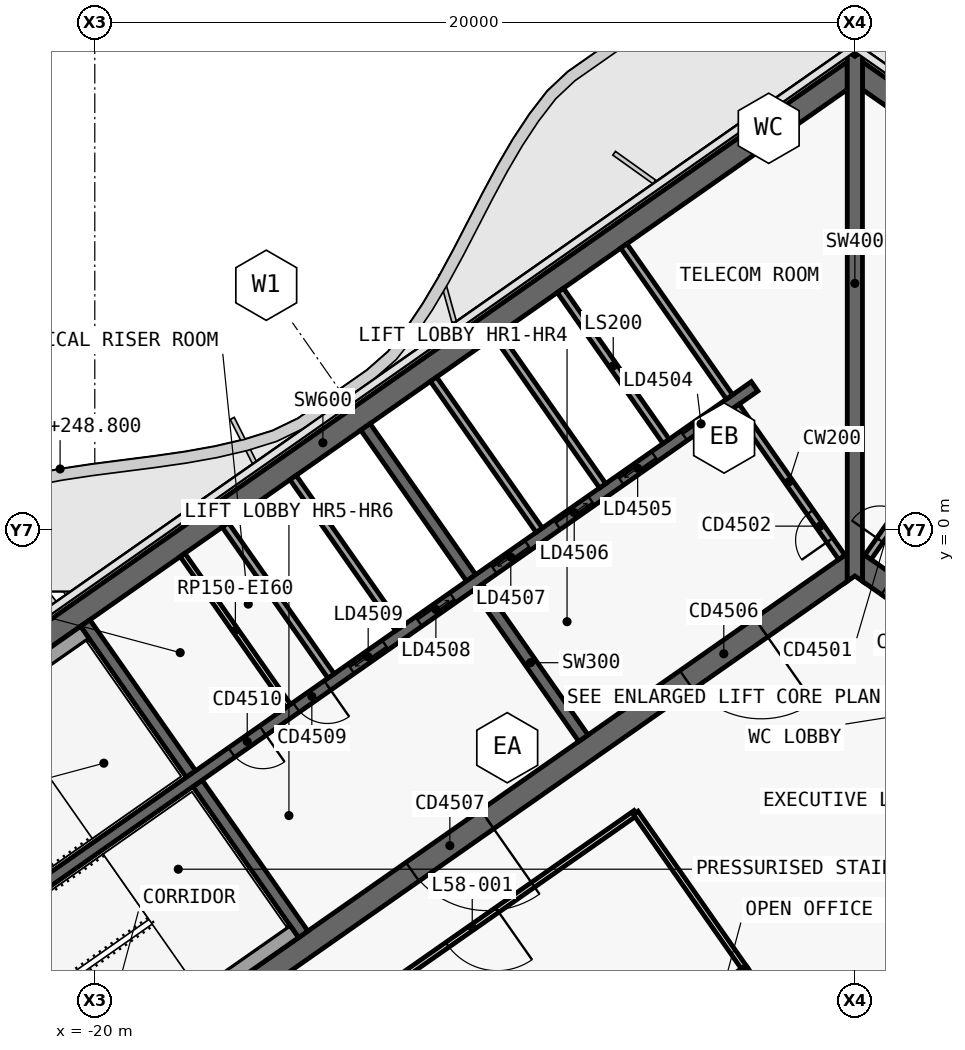
"""IFC4 building model, lengths in metres.
Left out: names, types, materials, properties, quantities, classifications, styles, units other than length and angle.
Written with IfcOpenShell. Run it as: python <this file> out.ifc"""

import sys

from ifc_helpers import new_model, si_unit, direction, frame, frame_2d, origin, place, context, subcontext, project, spatial, polyline, rectangle, outline, extrude, element, fill, save


model = new_model("IFC4")
c1 = context("Model", 3, precision=1e-05, world=origin(), true_north=direction((0.0, 1.0)))
c2 = subcontext(c1, "Body", "Model", "MODEL_VIEW")
j1 = project(units=[si_unit("LENGTHUNIT", "METRE"), si_unit("PLANEANGLEUNIT", "RADIAN")], contexts=[c1])
p1 = place(None, origin())
s1 = spatial("IfcSite", under=j1, at=p1, CompositionType="ELEMENT")
p2 = place(p1, origin())
s2 = spatial("IfcBuilding", under=s1, at=p2, CompositionType="ELEMENT")
p3 = place(p2, frame((0.0, 0.0, 248.8)))
s3 = spatial("IfcBuildingStorey", under=s2, at=p3, CompositionType="ELEMENT", Elevation=248.8)
p4 = place(p3, frame((-0.028, 12.066, 0.0), z_axis=(0.0, 0.0, 1.0), x_axis=(-0.819151382952, -0.573577380837, 0.0)))
e1 = element("IfcWall", 1, at=p4, inside=s3, PredefinedType="SHEAR", context=c2, shape_type="SweptSolid", body=[
    extrude(outline(polyline([(33.898, 0.3), (0.42, 0.3), (0.0, -0.3), (33.898, -0.3), (33.898, 0.3)])), origin(), (0.0, 0.0, 1.0), 3.9),
])
p5 = place(p3, frame((-0.028, -0.874, 0.0), z_axis=(0.0, 0.0, 1.0), x_axis=(-0.819150035022, -0.573579305871, 0.0)))
e2 = element("IfcWall", 2, at=p5, inside=s3, PredefinedType="SHEAR", context=c2, shape_type="SweptSolid", body=[
    extrude(outline(polyline([(26.476, 0.3), (0.42, 0.3), (0.0, -0.3), (26.476, -0.3), (26.476, 0.3)])), origin(), (0.0, 0.0, 1.0), 3.9),
])
p6 = place(p5, frame((2.976, 0.0, 0.0)))
e3 = element("IfcOpeningElement", 3, at=p6, cuts=e2, PredefinedType="OPENING", context=c2, shape_type="SweptSolid", body=[
    extrude(rectangle(XDim=2.4, YDim=2.1, at=frame_2d((1.2, 1.05))), frame((0.0, 0.31, 0.0), z_axis=(0.0, -1.0, 0.0), x_axis=(1.0, 0.0, 0.0)), (0.0, 0.0, 1.0), 0.62),
])
p7 = place(p5, frame((11.776, 0.0, 0.0)))
e4 = element("IfcOpeningElement", 4, at=p7, cuts=e2, PredefinedType="OPENING", context=c2, shape_type="SweptSolid", body=[
    extrude(rectangle(XDim=2.4, YDim=2.1, at=frame_2d((1.2, 1.05))), frame((0.0, 0.31, 0.0), z_axis=(0.0, -1.0, 0.0), x_axis=(1.0, 0.0, 0.0)), (0.0, 0.0, 1.0), 0.62),
])
p8 = place(p3, frame((-7.143, -5.49, 0.0), z_axis=(0.0, 0.0, 1.0), x_axis=(-0.573617744349, 0.819123118565, 0.0)))
e5 = element("IfcWall", 5, at=p8, inside=s3, PredefinedType="SHEAR", context=c2, shape_type="SweptSolid", body=[
    extrude(outline(polyline([(4.85, 0.15), (0.0, 0.15), (0.0, -0.15), (4.85, -0.15), (4.85, 0.15)])), origin(), (0.0, 0.0, 1.0), 3.9),
])
p9 = place(p3, frame((-10.097, -1.271, 0.0), z_axis=(0.0, 0.0, 1.0), x_axis=(-0.573560315113, 0.819163332265, 0.0)))
e6 = element("IfcWall", 6, at=p9, inside=s3, PredefinedType="SHEAR", context=c2, shape_type="SweptSolid", body=[
    extrude(outline(polyline([(4.85, -0.15), (4.85, 0.15), (0.0, 0.15), (0.0, -0.15), (4.85, -0.15)])), origin(), (0.0, 0.0, 1.0), 3.9),
])
p10 = place(p3, frame((-14.515, -10.652, 0.0), z_axis=(0.0, 0.0, 1.0), x_axis=(-0.573560315113, 0.819163332265, 0.0)))
e7 = element("IfcWall", 7, at=p10, inside=s3, PredefinedType="SHEAR", context=c2, shape_type="SweptSolid", body=[
    extrude(outline(polyline([(4.85, 0.15), (0.0, 0.15), (0.0, -0.15), (4.85, -0.15), (4.85, 0.15)])), origin(), (0.0, 0.0, 1.0), 3.9),
])
p11 = place(p3, frame((-17.469, -6.433, 0.0), z_axis=(0.0, 0.0, 1.0), x_axis=(-0.573594092424, 0.81913968109, 0.0)))
e8 = element("IfcWall", 8, at=p11, inside=s3, PredefinedType="SHEAR", context=c2, shape_type="SweptSolid", body=[
    extrude(outline(polyline([(4.85, -0.15), (4.85, 0.15), (0.0, 0.15), (0.0, -0.15), (4.85, -0.15)])), origin(), (0.0, 0.0, 1.0), 3.9),
])
p12 = place(p3, frame((-2.638, 3.768, 0.0), z_axis=(0.0, 0.0, 1.0), x_axis=(-0.819155014212, -0.573572194837, 0.0)))
e9 = element("IfcWall", 9, at=p12, inside=s3, PredefinedType="SHEAR", context=c2, shape_type="SweptSolid", body=[
    extrude(outline(polyline([(26.4, 0.15), (0.0, 0.15), (0.0, -0.15), (26.4, -0.15), (26.4, 0.15)])), origin(), (0.0, 0.0, 1.0), 3.9),
])
p13 = place(p12, frame((1.169, 0.0, 0.0)))
e10 = element("IfcOpeningElement", 10, at=p13, cuts=e9, PredefinedType="OPENING", context=c2, shape_type="SweptSolid", body=[
    extrude(rectangle(XDim=1.1, YDim=2.1, at=frame_2d((0.55, 1.05))), frame((0.0, 0.16, 0.0), z_axis=(0.0, -1.0, 0.0), x_axis=(1.0, 0.0, 0.0)), (0.0, 0.0, 1.0), 0.32),
])
p14 = place(p12, frame((3.206, 0.0, 0.0)))
e11 = element("IfcOpeningElement", 11, at=p14, cuts=e9, PredefinedType="OPENING", context=c2, shape_type="SweptSolid", body=[
    extrude(rectangle(XDim=1.1, YDim=2.1, at=frame_2d((0.55, 1.05))), frame((0.0, 0.16, 0.0), z_axis=(0.0, -1.0, 0.0), x_axis=(1.0, 0.0, 0.0)), (0.0, 0.0, 1.0), 0.32),
])
p15 = place(p12, frame((5.244, 0.0, 0.0)))
e12 = element("IfcOpeningElement", 12, at=p15, cuts=e9, PredefinedType="OPENING", context=c2, shape_type="SweptSolid", body=[
    extrude(rectangle(XDim=1.1, YDim=2.1, at=frame_2d((0.55, 1.05))), frame((0.0, 0.16, 0.0), z_axis=(0.0, -1.0, 0.0), x_axis=(1.0, 0.0, 0.0)), (0.0, 0.0, 1.0), 0.32),
])
p16 = place(p12, frame((7.281, 0.0, 0.0)))
e13 = element("IfcOpeningElement", 13, at=p16, cuts=e9, PredefinedType="OPENING", context=c2, shape_type="SweptSolid", body=[
    extrude(rectangle(XDim=1.1, YDim=2.1, at=frame_2d((0.55, 1.05))), frame((0.0, 0.16, 0.0), z_axis=(0.0, -1.0, 0.0), x_axis=(1.0, 0.0, 0.0)), (0.0, 0.0, 1.0), 0.32),
])
p17 = place(p12, frame((9.688, 0.0, 0.0)))
e14 = element("IfcOpeningElement", 14, at=p17, cuts=e9, PredefinedType="OPENING", context=c2, shape_type="SweptSolid", body=[
    extrude(rectangle(XDim=1.1, YDim=2.1, at=frame_2d((0.55, 1.05))), frame((0.0, 0.16, 0.0), z_axis=(0.0, -1.0, 0.0), x_axis=(1.0, 0.0, 0.0)), (0.0, 0.0, 1.0), 0.32),
])
p18 = place(p12, frame((11.863, 0.0, 0.0)))
e15 = element("IfcOpeningElement", 15, at=p18, cuts=e9, PredefinedType="OPENING", context=c2, shape_type="SweptSolid", body=[
    extrude(rectangle(XDim=1.1, YDim=2.1, at=frame_2d((0.55, 1.05))), frame((0.0, 0.16, 0.0), z_axis=(0.0, -1.0, 0.0), x_axis=(1.0, 0.0, 0.0)), (0.0, 0.0, 1.0), 0.32),
])
p19 = place(p12, frame((13.722, 0.0, 0.0)))
e16 = element("IfcOpeningElement", 16, at=p19, cuts=e9, PredefinedType="OPENING", context=c2, shape_type="SweptSolid", body=[
    extrude(rectangle(XDim=1.0, YDim=2.1, at=frame_2d((0.5, 1.05))), frame((0.0, 0.16, 0.0), z_axis=(0.0, -1.0, 0.0), x_axis=(1.0, 0.0, 0.0)), (0.0, 0.0, 1.0), 0.32),
])
p20 = place(p12, frame((15.798, 0.0, 0.0)))
e17 = element("IfcOpeningElement", 17, at=p20, cuts=e9, PredefinedType="OPENING", context=c2, shape_type="SweptSolid", body=[
    extrude(rectangle(XDim=1.0, YDim=2.1, at=frame_2d((0.5, 1.05))), frame((0.0, 0.16, 0.0), z_axis=(0.0, -1.0, 0.0), x_axis=(1.0, 0.0, 0.0)), (0.0, 0.0, 1.0), 0.32),
])
p21 = place(p3, frame((0.028, 12.066, 0.0), z_axis=(0.0, 0.0, 1.0), x_axis=(0.819151382952, -0.573577380837, 0.0)))
e18 = element("IfcWall", 18, at=p21, inside=s3, PredefinedType="SHEAR", context=c2, shape_type="SweptSolid", body=[
    extrude(outline(polyline([(33.898, 0.3), (0.0, 0.3), (0.42, -0.3), (33.898, -0.3), (33.898, 0.3)])), origin(), (0.0, 0.0, 1.0), 3.9),
])
p22 = place(p3, frame((0.028, -0.874, 0.0), z_axis=(0.0, 0.0, 1.0), x_axis=(0.819150035022, -0.573579305871, 0.0)))
e19 = element("IfcWall", 19, at=p22, inside=s3, PredefinedType="SHEAR", context=c2, shape_type="SweptSolid", body=[
    extrude(outline(polyline([(26.476, 0.3), (0.0, 0.3), (0.42, -0.3), (26.476, -0.3), (26.476, 0.3)])), origin(), (0.0, 0.0, 1.0), 3.9),
])
p23 = place(p22, frame((1.026, 0.0, 0.0)))
e20 = element("IfcOpeningElement", 20, at=p23, cuts=e19, PredefinedType="OPENING", context=c2, shape_type="SweptSolid", body=[
    extrude(rectangle(XDim=1.5, YDim=2.1, at=frame_2d((0.75, 1.05))), frame((0.0, 0.31, 0.0), z_axis=(0.0, -1.0, 0.0), x_axis=(1.0, 0.0, 0.0)), (0.0, 0.0, 1.0), 0.62),
])
p24 = place(p22, frame((12.226, 0.0, 0.0)))
e21 = element("IfcOpeningElement", 21, at=p24, cuts=e19, PredefinedType="OPENING", context=c2, shape_type="SweptSolid", body=[
    extrude(rectangle(XDim=1.5, YDim=2.1, at=frame_2d((0.75, 1.05))), frame((0.0, 0.31, 0.0), z_axis=(0.0, -1.0, 0.0), x_axis=(1.0, 0.0, 0.0)), (0.0, 0.0, 1.0), 0.62),
])
p25 = place(p3, frame((0.0, -1.361, 0.0), z_axis=(0.0, 0.0, 1.0), x_axis=(0.0, 1.0, 0.0)))
e22 = element("IfcWall", 22, at=p25, inside=s3, PredefinedType="SHEAR", context=c2, shape_type="SweptSolid", body=[
    extrude(outline(polyline([(0.14, 0.2), (0.0, 0.2), (0.14, 0.0), (0.0, -0.2), (0.14, -0.2), (1.012, -0.2), (12.94, -0.2), (13.813, -0.2), (13.893, -0.2), (13.933, -0.172), (13.813, 0.0), (13.933, 0.172), (13.893, 0.2), (13.813, 0.2), (12.94, 0.2), (1.012, 0.2), (0.14, 0.2)])), origin(), (0.0, 0.0, 1.0), 3.9),
])
p26 = place(p3, frame((-4.967, 2.321, 0.0), z_axis=(0.0, 0.0, 1.0), x_axis=(-0.573594092424, 0.81913968109, 0.0)))
e23 = element("IfcWall", 23, at=p26, inside=s3, PredefinedType="SOLIDWALL", context=c2, shape_type="SweptSolid", body=[
    extrude(rectangle(XDim=4.85, YDim=0.2, at=frame_2d((2.425, 0.0))), origin(), (0.0, 0.0, 1.0), 3.9),
])
p27 = place(p3, frame((-6.636, 1.152, 0.0), z_axis=(0.0, 0.0, 1.0), x_axis=(-0.573560315113, 0.819163332265, 0.0)))
e24 = element("IfcWall", 24, at=p27, inside=s3, PredefinedType="SOLIDWALL", context=c2, shape_type="SweptSolid", body=[
    extrude(rectangle(XDim=4.85, YDim=0.2, at=frame_2d((2.425, 0.0))), origin(), (0.0, 0.0, 1.0), 3.9),
])
p28 = place(p3, frame((-8.305, -0.017, 0.0), z_axis=(0.0, 0.0, 1.0), x_axis=(-0.573594092424, 0.81913968109, 0.0)))
e25 = element("IfcWall", 25, at=p28, inside=s3, PredefinedType="SOLIDWALL", context=c2, shape_type="SweptSolid", body=[
    extrude(rectangle(XDim=4.85, YDim=0.2, at=frame_2d((2.425, 0.0))), origin(), (0.0, 0.0, 1.0), 3.9),
])
p29 = place(p3, frame((-14.909, -4.641, 0.0), z_axis=(0.0, 0.0, 1.0), x_axis=(-0.573560315113, 0.819163332265, 0.0)))
e26 = element("IfcWall", 26, at=p29, inside=s3, PredefinedType="PARTITIONING", context=c2, shape_type="SweptSolid", body=[
    extrude(rectangle(XDim=4.85, YDim=0.15, at=frame_2d((2.425, 0.0))), origin(), (0.0, 0.0, 1.0), 3.62),
])
p30 = place(p3, frame((-12.001, -2.605, 0.0), z_axis=(0.0, 0.0, 1.0), x_axis=(-0.573560315113, 0.819163332265, 0.0)))
e27 = element("IfcWall", 27, at=p30, inside=s3, PredefinedType="SOLIDWALL", context=c2, shape_type="SweptSolid", body=[
    extrude(rectangle(XDim=4.85, YDim=0.2, at=frame_2d((2.425, 0.0))), origin(), (0.0, 0.0, 1.0), 3.9),
])
p31 = place(p3, frame((-13.783, -3.852, 0.0), z_axis=(0.0, 0.0, 1.0), x_axis=(-0.573594092424, 0.81913968109, 0.0)))
e28 = element("IfcWall", 28, at=p31, inside=s3, PredefinedType="SOLIDWALL", context=c2, shape_type="SweptSolid", body=[
    extrude(rectangle(XDim=4.85, YDim=0.2, at=frame_2d((2.425, 0.0))), origin(), (0.0, 0.0, 1.0), 3.9),
])
p32 = place(p3, frame((-20.259, -2.71, 0.0), z_axis=(0.0, 0.0, 1.0), x_axis=(-0.81914849389, -0.573581506813, 0.0)))
e29 = element("IfcWall", 29, at=p32, inside=s3, PredefinedType="SOLIDWALL", context=c2, shape_type="SweptSolid", body=[
    extrude(rectangle(XDim=8.25, YDim=0.4, at=frame_2d((4.125, 0.0))), origin(), (0.0, 0.0, 1.0), 3.62),
])
p33 = place(p3, frame((-14.753, -10.574, 0.0), z_axis=(0.0, 0.0, 1.0), x_axis=(-0.819158229677, -0.573567602601, 0.0)))
e30 = element("IfcWall", 30, at=p33, inside=s3, PredefinedType="SOLIDWALL", context=c2, shape_type="SweptSolid", body=[
    extrude(rectangle(XDim=8.25, YDim=0.4, at=frame_2d((4.125, 0.0))), origin(), (0.0, 0.0, 1.0), 3.62),
])
p34 = place(p3, frame((-0.344, -0.729, 0.0), z_axis=(0.0, 0.0, 1.0), x_axis=(-0.573560315113, 0.819163332265, 0.0)))
e31 = element("IfcWall", 31, at=p34, inside=s3, PredefinedType="SOLIDWALL", context=c2, shape_type="SweptSolid", body=[
    extrude(rectangle(XDim=4.85, YDim=0.2, at=frame_2d((2.425, 0.0))), origin(), (0.0, 0.0, 1.0), 3.62),
])
p35 = place(p34, frame((0.55, 0.0, 0.0)))
e32 = element("IfcOpeningElement", 32, at=p35, cuts=e31, PredefinedType="OPENING", context=c2, shape_type="SweptSolid", body=[
    extrude(rectangle(XDim=0.9, YDim=2.1, at=frame_2d((0.45, 1.05))), frame((0.0, 0.11, 0.0), z_axis=(0.0, -1.0, 0.0), x_axis=(1.0, 0.0, 0.0)), (0.0, 0.0, 1.0), 0.22),
])
p36 = place(p3, frame((-3.298, 3.49, 0.0), z_axis=(0.0, 0.0, 1.0), x_axis=(-0.573560315113, 0.819163332265, 0.0)))
e33 = element("IfcWall", 33, at=p36, inside=s3, PredefinedType="SOLIDWALL", context=c2, shape_type="SweptSolid", body=[
    extrude(rectangle(XDim=4.85, YDim=0.2, at=frame_2d((2.425, 0.0))), origin(), (0.0, 0.0, 1.0), 3.62),
])
p37 = place(p3, frame((0.344, -0.729, 0.0), z_axis=(0.0, 0.0, 1.0), x_axis=(0.573560315113, 0.819163332265, 0.0)))
e34 = element("IfcWall", 34, at=p37, inside=s3, PredefinedType="SOLIDWALL", context=c2, shape_type="SweptSolid", body=[
    extrude(rectangle(XDim=4.85, YDim=0.2, at=frame_2d((2.425, 0.0))), origin(), (0.0, 0.0, 1.0), 3.62),
])
p38 = place(p37, frame((0.55, 0.0, 0.0)))
e35 = element("IfcOpeningElement", 35, at=p38, cuts=e34, PredefinedType="OPENING", context=c2, shape_type="SweptSolid", body=[
    extrude(rectangle(XDim=0.9, YDim=2.1, at=frame_2d((0.45, 1.05))), frame((0.0, 0.11, 0.0), z_axis=(0.0, -1.0, 0.0), x_axis=(1.0, 0.0, 0.0)), (0.0, 0.0, 1.0), 0.22),
])
p39 = place(p3, frame((-5.766, -7.456, 0.0), z_axis=(0.0, 0.0, 1.0), x_axis=(-0.819154371039, -0.573573113393, 0.0)))
e36 = element("IfcWall", 36, at=p39, inside=s3, PredefinedType="PARTITIONING", context=c2, shape_type="SweptSolid", body=[
    extrude(rectangle(XDim=10.502, YDim=0.15, at=frame_2d((5.251, 0.0))), origin(), (0.0, 0.0, 1.0), 3.05),
])
p40 = place(p39, frame((4.451, 0.0, 0.0)))
e37 = element("IfcOpeningElement", 37, at=p40, cuts=e36, PredefinedType="OPENING", context=c2, shape_type="SweptSolid", body=[
    extrude(rectangle(XDim=1.6, YDim=2.1, at=frame_2d((0.8, 1.05))), frame((0.0, 0.085, 0.0), z_axis=(0.0, -1.0, 0.0), x_axis=(1.0, 0.0, 0.0)), (0.0, 0.0, 1.0), 0.17),
])
p41 = place(p3, frame((-1.849, -13.051, 0.0), z_axis=(0.0, 0.0, 1.0), x_axis=(-0.573542889209, 0.819175533227, 0.0)))
e38 = element("IfcWall", 38, at=p41, inside=s3, PredefinedType="PARTITIONING", context=c2, shape_type="SweptSolid", body=[
    extrude(rectangle(XDim=1.831, YDim=0.15, at=frame_2d((0.916, 0.0))), origin(), (0.0, 0.0, 1.0), 3.05),
])
p42 = place(p3, frame((-2.897, -11.553, 0.0), z_axis=(0.0, 0.0, 1.0), x_axis=(-0.573593309886, 0.819140229054, 0.0)))
e39 = element("IfcWall", 39, at=p42, inside=s3, PredefinedType="PARTITIONING", context=c2, shape_type="SweptSolid", body=[
    extrude(rectangle(XDim=5.004, YDim=0.15, at=frame_2d((2.502, 0.0))), origin(), (0.0, 0.0, 1.0), 3.05),
])
p43 = place(p3, frame((-2.898, -11.552, 0.0), z_axis=(0.0, 0.0, 1.0), x_axis=(-0.819155448096, -0.573571575181, 0.0)))
e40 = element("IfcWall", 40, at=p43, inside=s3, PredefinedType="PARTITIONING", context=c2, shape_type="SweptSolid", body=[
    extrude(rectangle(XDim=10.5, YDim=0.1, at=frame_2d((5.25, 0.0))), origin(), (0.0, 0.0, 1.0), 3.05),
])
p44 = place(p43, frame((4.8, 0.0, 0.0)))
e41 = element("IfcOpeningElement", 41, at=p44, cuts=e40, PredefinedType="OPENING", context=c2, shape_type="SweptSolid", body=[
    extrude(rectangle(XDim=0.9, YDim=2.1, at=frame_2d((0.45, 1.05))), frame((0.0, 0.06, 0.0), z_axis=(0.0, -1.0, 0.0), x_axis=(1.0, 0.0, 0.0)), (0.0, 0.0, 1.0), 0.12),
])
p45 = place(p13, origin())
e42 = element("IfcDoor", 42, at=p45, inside=s3, OperationType="SLIDING_TO_LEFT", PredefinedType="DOOR", context=c2, shape_type="SweptSolid", body=[
    extrude(rectangle(XDim=1.1, YDim=2.1, at=frame_2d((0.55, 1.05))), frame((0.0, 0.025, 0.0), z_axis=(0.0, -1.0, 0.0), x_axis=(1.0, 0.0, 0.0)), (0.0, 0.0, 1.0), 0.05),
])
fill(e10, e42)
p46 = place(p14, origin())
e43 = element("IfcDoor", 43, at=p46, inside=s3, OperationType="SLIDING_TO_RIGHT", PredefinedType="DOOR", context=c2, shape_type="SweptSolid", body=[
    extrude(rectangle(XDim=1.1, YDim=2.1, at=frame_2d((0.55, 1.05))), frame((0.0, 0.025, 0.0), z_axis=(0.0, -1.0, 0.0), x_axis=(1.0, 0.0, 0.0)), (0.0, 0.0, 1.0), 0.05),
])
fill(e11, e43)
p47 = place(p15, origin())
e44 = element("IfcDoor", 44, at=p47, inside=s3, OperationType="SLIDING_TO_LEFT", PredefinedType="DOOR", context=c2, shape_type="SweptSolid", body=[
    extrude(rectangle(XDim=1.1, YDim=2.1, at=frame_2d((0.55, 1.05))), frame((0.0, 0.025, 0.0), z_axis=(0.0, -1.0, 0.0), x_axis=(1.0, 0.0, 0.0)), (0.0, 0.0, 1.0), 0.05),
])
fill(e12, e44)
p48 = place(p16, origin())
e45 = element("IfcDoor", 45, at=p48, inside=s3, OperationType="SLIDING_TO_RIGHT", PredefinedType="DOOR", context=c2, shape_type="SweptSolid", body=[
    extrude(rectangle(XDim=1.1, YDim=2.1, at=frame_2d((0.55, 1.05))), frame((0.0, 0.025, 0.0), z_axis=(0.0, -1.0, 0.0), x_axis=(1.0, 0.0, 0.0)), (0.0, 0.0, 1.0), 0.05),
])
fill(e13, e45)
p49 = place(p17, origin())
e46 = element("IfcDoor", 46, at=p49, inside=s3, OperationType="SLIDING_TO_LEFT", PredefinedType="DOOR", context=c2, shape_type="SweptSolid", body=[
    extrude(rectangle(XDim=1.1, YDim=2.1, at=frame_2d((0.55, 1.05))), frame((0.0, 0.025, 0.0), z_axis=(0.0, -1.0, 0.0), x_axis=(1.0, 0.0, 0.0)), (0.0, 0.0, 1.0), 0.05),
])
fill(e14, e46)
p50 = place(p18, origin())
e47 = element("IfcDoor", 47, at=p50, inside=s3, OperationType="SLIDING_TO_RIGHT", PredefinedType="DOOR", context=c2, shape_type="SweptSolid", body=[
    extrude(rectangle(XDim=1.1, YDim=2.1, at=frame_2d((0.55, 1.05))), frame((0.0, 0.025, 0.0), z_axis=(0.0, -1.0, 0.0), x_axis=(1.0, 0.0, 0.0)), (0.0, 0.0, 1.0), 0.05),
])
fill(e15, e47)
p51 = place(p19, origin())
e48 = element("IfcDoor", 48, at=p51, inside=s3, OperationType="SINGLE_SWING_RIGHT", PredefinedType="DOOR", context=c2, shape_type="SweptSolid", body=[
    extrude(rectangle(XDim=1.0, YDim=2.1, at=frame_2d((0.5, 1.05))), frame((0.0, 0.025, 0.0), z_axis=(0.0, -1.0, 0.0), x_axis=(1.0, 0.0, 0.0)), (0.0, 0.0, 1.0), 0.05),
])
fill(e16, e48)
p52 = place(p20, origin())
e49 = element("IfcDoor", 49, at=p52, inside=s3, OperationType="SINGLE_SWING_RIGHT", PredefinedType="DOOR", context=c2, shape_type="SweptSolid", body=[
    extrude(rectangle(XDim=1.0, YDim=2.1, at=frame_2d((0.5, 1.05))), frame((0.0, 0.025, 0.0), z_axis=(0.0, -1.0, 0.0), x_axis=(1.0, 0.0, 0.0)), (0.0, 0.0, 1.0), 0.05),
])
fill(e17, e49)
p53 = place(p6, origin())
e50 = element("IfcDoor", 50, at=p53, inside=s3, OperationType="DOUBLE_DOOR_SINGLE_SWING", PredefinedType="DOOR", context=c2, shape_type="SweptSolid", body=[
    extrude(rectangle(XDim=2.4, YDim=2.1, at=frame_2d((1.2, 1.05))), frame((0.0, 0.025, 0.0), z_axis=(0.0, -1.0, 0.0), x_axis=(1.0, 0.0, 0.0)), (0.0, 0.0, 1.0), 0.05),
])
fill(e3, e50)
p54 = place(p7, origin())
e51 = element("IfcDoor", 51, at=p54, inside=s3, OperationType="DOUBLE_DOOR_SINGLE_SWING", PredefinedType="DOOR", context=c2, shape_type="SweptSolid", body=[
    extrude(rectangle(XDim=2.4, YDim=2.1, at=frame_2d((1.2, 1.05))), frame((0.0, 0.025, 0.0), z_axis=(0.0, -1.0, 0.0), x_axis=(1.0, 0.0, 0.0)), (0.0, 0.0, 1.0), 0.05),
])
fill(e4, e51)
p55 = place(p35, origin())
e52 = element("IfcDoor", 52, at=p55, inside=s3, OperationType="SINGLE_SWING_RIGHT", PredefinedType="DOOR", context=c2, shape_type="SweptSolid", body=[
    extrude(rectangle(XDim=0.9, YDim=2.1, at=frame_2d((0.45, 1.05))), frame((0.0, 0.025, 0.0), z_axis=(0.0, -1.0, 0.0), x_axis=(1.0, 0.0, 0.0)), (0.0, 0.0, 1.0), 0.05),
])
fill(e32, e52)
p56 = place(p38, origin())
e53 = element("IfcDoor", 53, at=p56, inside=s3, OperationType="SINGLE_SWING_RIGHT", PredefinedType="DOOR", context=c2, shape_type="SweptSolid", body=[
    extrude(rectangle(XDim=0.9, YDim=2.1, at=frame_2d((0.45, 1.05))), frame((0.0, 0.025, 0.0), z_axis=(0.0, -1.0, 0.0), x_axis=(1.0, 0.0, 0.0)), (0.0, 0.0, 1.0), 0.05),
])
fill(e35, e53)
p57 = place(p40, origin())
e54 = element("IfcDoor", 54, at=p57, inside=s3, OperationType="DOUBLE_DOOR_SINGLE_SWING", PredefinedType="DOOR", context=c2, shape_type="SweptSolid", body=[
    extrude(rectangle(XDim=1.6, YDim=2.1, at=frame_2d((0.8, 1.05))), frame((0.0, 0.025, 0.0), z_axis=(0.0, -1.0, 0.0), x_axis=(1.0, 0.0, 0.0)), (0.0, 0.0, 1.0), 0.05),
])
fill(e37, e54)
save(model, sys.argv[1])
